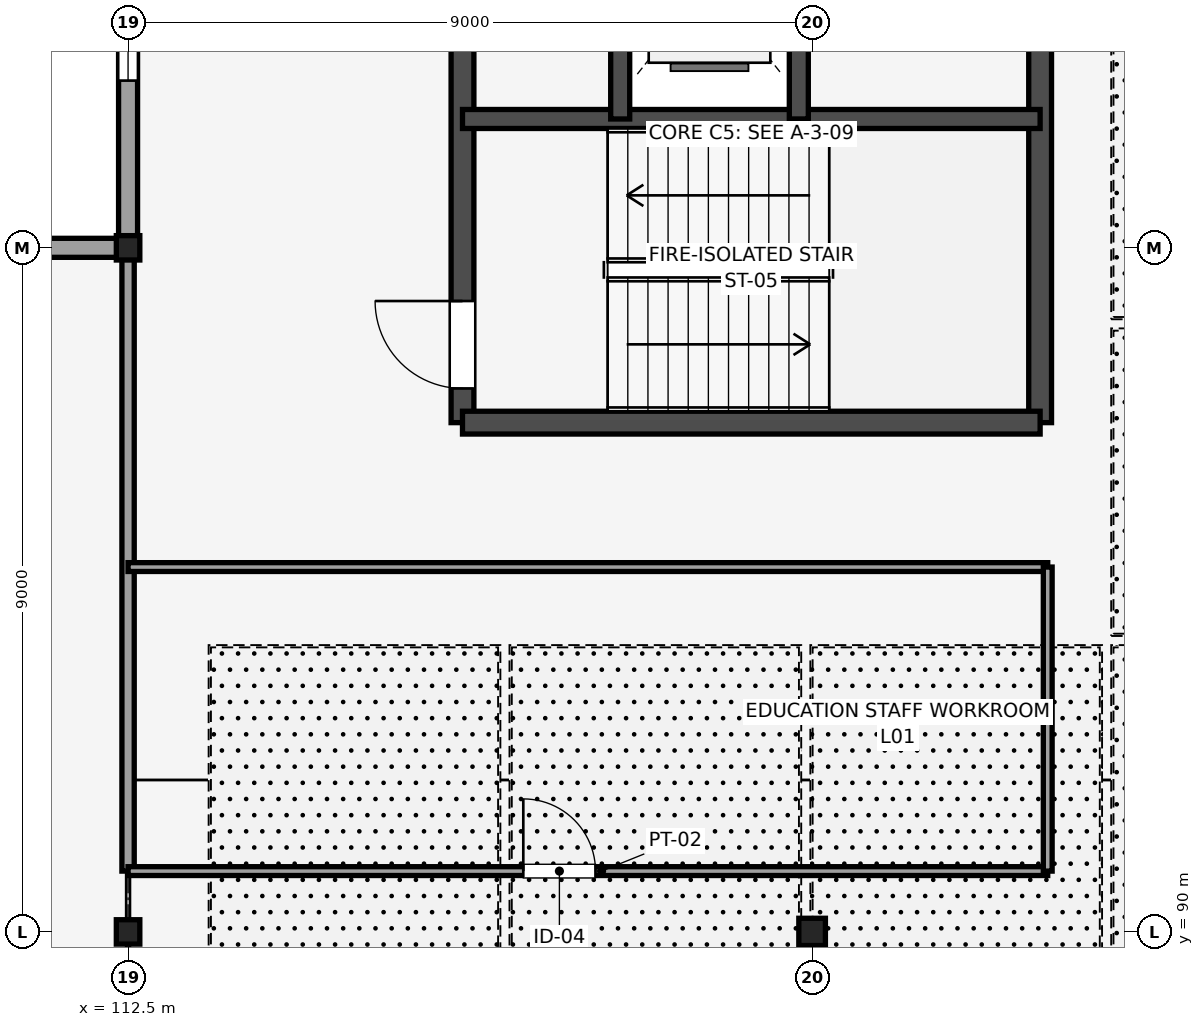
"""IFC4 building model, lengths in metres.
Left out: names, types, materials, properties, quantities, classifications, styles, units other than length and angle.
Written with IfcOpenShell. Run it as: python <this file> out.ifc"""

import sys

from ifc_helpers import new_model, si_unit, direction, frame, frame_2d, origin, origin_2d, place, context, subcontext, project, spatial, rectangle, i_section, extrude, element, fill, save


model = new_model("IFC4")
c1 = context("Model", 3, precision=1e-05, world=origin(), true_north=direction((0.0, 1.0)))
c2 = subcontext(c1, "Body", "Model", "MODEL_VIEW")
j1 = project(units=[si_unit("LENGTHUNIT", "METRE"), si_unit("PLANEANGLEUNIT", "RADIAN")], contexts=[c1])
p1 = place(None, origin())
s1 = spatial("IfcSite", under=j1, at=p1, CompositionType="ELEMENT")
p2 = place(p1, origin())
s2 = spatial("IfcBuilding", under=s1, at=p2, CompositionType="ELEMENT")
p3 = place(p2, frame((0.0, 0.0, 5.4)))
s3 = spatial("IfcBuildingStorey", under=s2, at=p3, CompositionType="ELEMENT", Elevation=5.4)
for number, where, z_axis, x_axis in (
    (1, (112.5, 90.0, 0.0), (0.0, 0.0, 1.0), (1.0, 0.0, 0.0)),
    (2, (112.5, 99.0, 0.0), (0.0, 0.0, 1.0), (1.0, 0.0, 0.0)),
):
    element("IfcColumn", number, at=place(p3, frame(where, z_axis=z_axis, x_axis=x_axis)), inside=s3, PredefinedType="COLUMN", context=c2, shape_type="SweptSolid", body=[
        extrude(i_section(OverallWidth=0.309, OverallDepth=0.321, WebThickness=0.014, FlangeThickness=0.022, FilletRadius=0.017, at=origin_2d()), origin(), (0.0, 0.0, 1.0), 4.5),
    ])
p4 = place(p3, frame((121.5, 90.0, 0.0), z_axis=(0.0, 0.0, 1.0), x_axis=(1.0, 0.0, 0.0)))
e3 = element("IfcColumn", 3, at=p4, inside=s3, PredefinedType="COLUMN", context=c2, shape_type="SweptSolid", body=[
    extrude(i_section(OverallWidth=0.35, OverallDepth=0.359, WebThickness=0.016, FlangeThickness=0.024, FilletRadius=0.014, at=origin_2d()), origin(), (0.0, 0.0, 1.0), 4.5),
])
p5 = place(p3, frame((116.9, 96.7, 0.0), z_axis=(0.0, 0.0, 1.0), x_axis=(0.0, 1.0, 0.0)))
e4 = element("IfcWall", 4, at=p5, inside=s3, PredefinedType="SHEAR", context=c2, shape_type="SweptSolid", body=[
    extrude(rectangle(XDim=7.6, YDim=0.3, at=frame_2d((3.8, 0.0))), origin(), (0.0, 0.0, 1.0), 4.5),
])
p6 = place(p5, frame((0.45, 0.0, 0.0)))
e5 = element("IfcOpeningElement", 5, at=p6, cuts=e4, PredefinedType="OPENING", context=c2, shape_type="SweptSolid", body=[
    extrude(rectangle(XDim=1.15, YDim=2.15, at=frame_2d((0.575, 1.075))), frame((0.0, 0.16, 0.0), z_axis=(0.0, -1.0, 0.0), x_axis=(1.0, 0.0, 0.0)), (0.0, 0.0, 1.0), 0.32),
])
for number, where, z_axis, x_axis in (
    (6, (124.5, 96.7, 0.0), (0.0, 0.0, 1.0), (0.0, 1.0, 0.0)),
    (7, (116.9, 96.7, 0.0), (0.0, 0.0, 1.0), (1.0, 0.0, 0.0)),
):
    element("IfcWall", number, at=place(p3, frame(where, z_axis=z_axis, x_axis=x_axis)), inside=s3, PredefinedType="SHEAR", context=c2, shape_type="SweptSolid", body=[
        extrude(rectangle(XDim=7.6, YDim=0.3, at=frame_2d((3.8, 0.0))), origin(), (0.0, 0.0, 1.0), 4.5),
    ])
p7 = place(p3, frame((116.9, 100.695, 0.0), z_axis=(0.0, 0.0, 1.0), x_axis=(1.0, 0.0, 0.0)))
e8 = element("IfcWall", 8, at=p7, inside=s3, PredefinedType="SHEAR", context=c2, shape_type="SweptSolid", body=[
    extrude(rectangle(XDim=7.6, YDim=0.25, at=frame_2d((3.8, 0.0))), origin(), (0.0, 0.0, 1.0), 4.5),
])
for number, where, z_axis, x_axis in (
    (9, (118.975, 100.695, 0.0), (0.0, 0.0, 1.0), (0.0, 1.0, 0.0)),
    (10, (121.325, 100.695, 0.0), (0.0, 0.0, 1.0), (0.0, 1.0, 0.0)),
):
    element("IfcWall", number, at=place(p3, frame(where, z_axis=z_axis, x_axis=x_axis)), inside=s3, PredefinedType="SHEAR", context=c2, shape_type="SweptSolid", body=[
        extrude(rectangle(XDim=3.605, YDim=0.25, at=frame_2d((1.802, 0.0))), origin(), (0.0, 0.0, 1.0), 4.5),
    ])
p8 = place(p3, frame((112.5, 99.0, 0.0), z_axis=(0.0, 0.0, 1.0), x_axis=(-1.0, 0.0, 0.0)))
e11 = element("IfcWall", 11, at=p8, inside=s3, PredefinedType="STANDARD", context=c2, shape_type="SweptSolid", body=[
    extrude(rectangle(XDim=13.5, YDim=0.25, at=frame_2d((6.75, 0.0))), origin(), (0.0, 0.0, 1.0), 3.767),
])
p9 = place(p8, frame((1.35, 0.0, 1.0)))
e12 = element("IfcOpeningElement", 12, at=p9, cuts=e11, PredefinedType="OPENING", context=c2, shape_type="SweptSolid", body=[
    extrude(rectangle(XDim=1.8, YDim=1.5, at=frame_2d((0.9, 0.75))), frame((0.0, 0.135, 0.0), z_axis=(0.0, -1.0, 0.0), x_axis=(1.0, 0.0, 0.0)), (0.0, 0.0, 1.0), 0.27),
])
p10 = place(p8, frame((9.6, 0.0, 1.0)))
e13 = element("IfcOpeningElement", 13, at=p10, cuts=e11, PredefinedType="OPENING", context=c2, shape_type="SweptSolid", body=[
    extrude(rectangle(XDim=1.8, YDim=1.5, at=frame_2d((0.9, 0.75))), frame((0.0, 0.135, 0.0), z_axis=(0.0, -1.0, 0.0), x_axis=(1.0, 0.0, 0.0)), (0.0, 0.0, 1.0), 0.27),
])
p11 = place(p8, frame((5.6, 0.0, 0.6)))
e14 = element("IfcOpeningElement", 14, at=p11, cuts=e11, PredefinedType="OPENING", context=c2, shape_type="SweptSolid", body=[
    extrude(rectangle(XDim=3.0, YDim=2.4, at=frame_2d((1.5, 1.2))), frame((0.0, 0.135, 0.0), z_axis=(0.0, -1.0, 0.0), x_axis=(1.0, 0.0, 0.0)), (0.0, 0.0, 1.0), 0.27),
])
p12 = place(p3, frame((112.5, 111.6, 0.0), z_axis=(0.0, 0.0, 1.0), x_axis=(0.0, -1.0, 0.0)))
e15 = element("IfcWall", 15, at=p12, inside=s3, PredefinedType="STANDARD", context=c2, shape_type="SweptSolid", body=[
    extrude(rectangle(XDim=12.6, YDim=0.25, at=frame_2d((6.3, 0.0))), origin(), (0.0, 0.0, 1.0), 3.846),
])
p13 = place(p12, frame((0.65, 0.0, 1.0)))
e16 = element("IfcOpeningElement", 16, at=p13, cuts=e15, PredefinedType="OPENING", context=c2, shape_type="SweptSolid", body=[
    extrude(rectangle(XDim=1.5, YDim=1.5, at=frame_2d((0.75, 0.75))), frame((0.0, 0.135, 0.0), z_axis=(0.0, -1.0, 0.0), x_axis=(1.0, 0.0, 0.0)), (0.0, 0.0, 1.0), 0.27),
])
p14 = place(p12, frame((8.9, 0.0, 1.0)))
e17 = element("IfcOpeningElement", 17, at=p14, cuts=e15, PredefinedType="OPENING", context=c2, shape_type="SweptSolid", body=[
    extrude(rectangle(XDim=1.5, YDim=1.5, at=frame_2d((0.75, 0.75))), frame((0.0, 0.135, 0.0), z_axis=(0.0, -1.0, 0.0), x_axis=(1.0, 0.0, 0.0)), (0.0, 0.0, 1.0), 0.27),
])
p15 = place(p12, frame((4.6, 0.0, 1.0)))
e18 = element("IfcOpeningElement", 18, at=p15, cuts=e15, PredefinedType="OPENING", context=c2, shape_type="SweptSolid", body=[
    extrude(rectangle(XDim=1.55, YDim=1.55, at=frame_2d((0.775, 0.775))), frame((0.0, 0.135, 0.0), z_axis=(0.0, -1.0, 0.0), x_axis=(1.0, 0.0, 0.0)), (0.0, 0.0, 1.0), 0.27),
])
p16 = place(p3, frame((112.5, 90.8, 0.0), z_axis=(0.0, 0.0, 1.0), x_axis=(0.0, 1.0, 0.0)))
e19 = element("IfcWall", 19, at=p16, inside=s3, PredefinedType="PARTITIONING", context=c2, shape_type="SweptSolid", body=[
    extrude(rectangle(XDim=8.2, YDim=0.162, at=frame_2d((4.1, 0.0))), origin(), (0.0, 0.0, 1.0), 3.846),
])
p17 = place(p3, frame((112.5, 90.8, 0.0), z_axis=(0.0, 0.0, 1.0), x_axis=(1.0, 0.0, 0.0)))
e20 = element("IfcWall", 20, at=p17, inside=s3, PredefinedType="PARTITIONING", context=c2, shape_type="SweptSolid", body=[
    extrude(rectangle(XDim=12.1, YDim=0.116, at=frame_2d((6.05, 0.0))), origin(), (0.0, 0.0, 1.0), 4.32),
])
p18 = place(p17, frame((5.2, 0.0, 0.0)))
e21 = element("IfcOpeningElement", 21, at=p18, cuts=e20, PredefinedType="OPENING", context=c2, shape_type="SweptSolid", body=[
    extrude(rectangle(XDim=0.95, YDim=2.15, at=frame_2d((0.475, 1.075))), frame((0.0, 0.068, 0.0), z_axis=(0.0, -1.0, 0.0), x_axis=(1.0, 0.0, 0.0)), (0.0, 0.0, 1.0), 0.136),
])
p19 = place(p3, frame((112.5, 94.8, 0.0), z_axis=(0.0, 0.0, 1.0), x_axis=(1.0, 0.0, 0.0)))
e22 = element("IfcWall", 22, at=p19, inside=s3, PredefinedType="PARTITIONING", context=c2, shape_type="SweptSolid", body=[
    extrude(rectangle(XDim=12.1, YDim=0.116, at=frame_2d((6.05, 0.0))), origin(), (0.0, 0.0, 1.0), 4.32),
])
p20 = place(p3, frame((124.6, 90.8, 0.0), z_axis=(0.0, 0.0, 1.0), x_axis=(0.0, 1.0, 0.0)))
e23 = element("IfcWall", 23, at=p20, inside=s3, PredefinedType="PARTITIONING", context=c2, shape_type="SweptSolid", body=[
    extrude(rectangle(XDim=4.0, YDim=0.116, at=frame_2d((2.0, 0.0))), origin(), (0.0, 0.0, 1.0), 4.32),
])
p21 = place(p14, origin())
e24 = element("IfcWindow", 24, at=p21, inside=s3, PartitioningType="SINGLE_PANEL", PredefinedType="WINDOW", context=c2, shape_type="SweptSolid", body=[
    extrude(rectangle(XDim=1.5, YDim=1.5, at=frame_2d((0.75, 0.75))), frame((0.0, 0.03, 0.0), z_axis=(0.0, -1.0, 0.0), x_axis=(1.0, 0.0, 0.0)), (0.0, 0.0, 1.0), 0.06),
])
fill(e17, e24)
p22 = place(p6, origin())
e25 = element("IfcDoor", 25, at=p22, inside=s3, OperationType="SINGLE_SWING_RIGHT", PredefinedType="DOOR", context=c2, shape_type="SweptSolid", body=[
    extrude(rectangle(XDim=1.15, YDim=2.15, at=frame_2d((0.575, 1.075))), frame((0.0, 0.025, 0.0), z_axis=(0.0, -1.0, 0.0), x_axis=(1.0, 0.0, 0.0)), (0.0, 0.0, 1.0), 0.05),
])
fill(e5, e25)
p23 = place(p18, origin())
e26 = element("IfcDoor", 26, at=p23, inside=s3, OperationType="SINGLE_SWING_LEFT", PredefinedType="DOOR", context=c2, shape_type="SweptSolid", body=[
    extrude(rectangle(XDim=0.95, YDim=2.15, at=frame_2d((0.475, 1.075))), frame((0.0, 0.025, 0.0), z_axis=(0.0, -1.0, 0.0), x_axis=(1.0, 0.0, 0.0)), (0.0, 0.0, 1.0), 0.05),
])
fill(e21, e26)
save(model, sys.argv[1])
